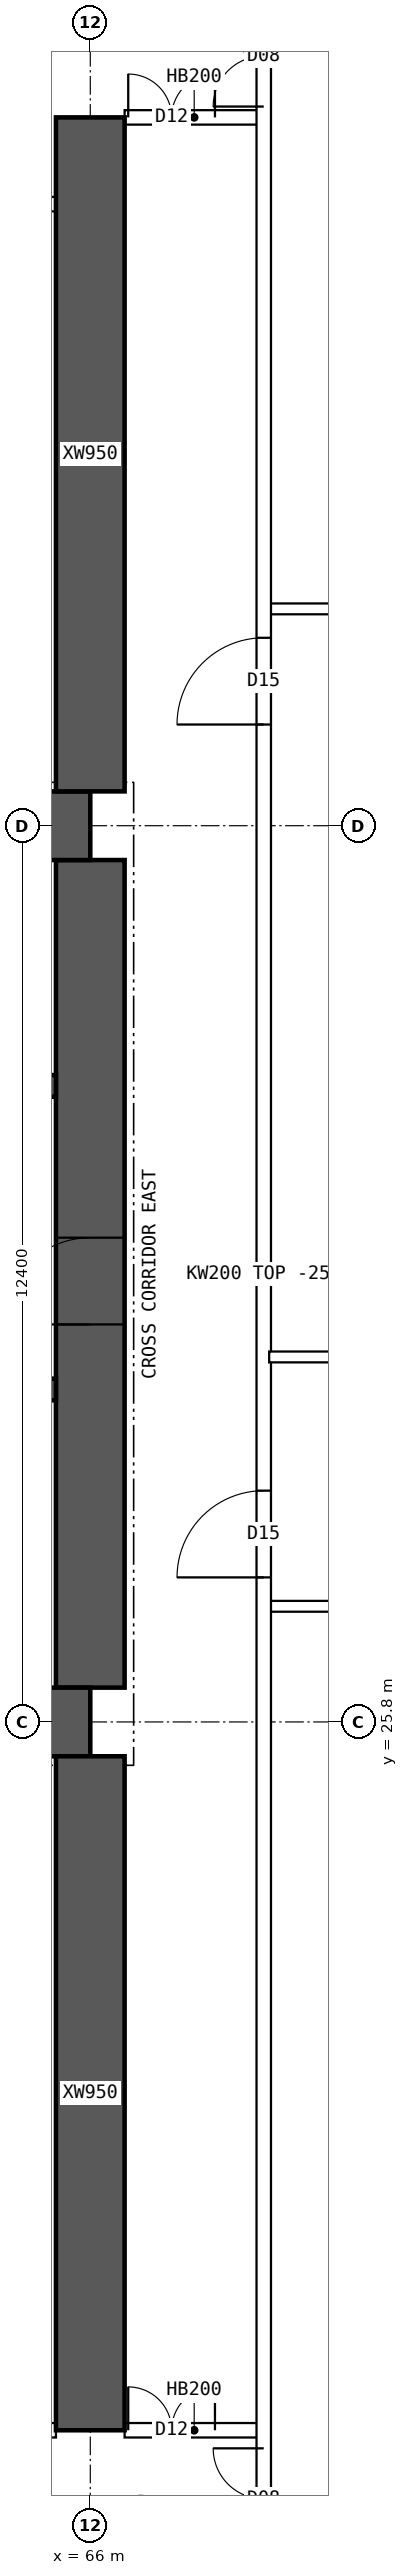
"""IFC4 building model, lengths in metres.
Left out: names, types, materials, properties, quantities, classifications, styles, units other than length and angle.
Written with IfcOpenShell. Run it as: python <this file> out.ifc"""

import sys

from ifc_helpers import new_model, si_unit, direction, frame, frame_2d, origin, place, context, subcontext, project, spatial, polyline, rectangle, outline, extrude, element, fill, save


model = new_model("IFC4")
c1 = context("Model", 3, precision=1e-05, world=origin(), true_north=direction((0.0, 1.0)))
c2 = subcontext(c1, "Body", "Model", "MODEL_VIEW")
j1 = project(units=[si_unit("LENGTHUNIT", "METRE"), si_unit("PLANEANGLEUNIT", "RADIAN")], contexts=[c1])
p1 = place(None, origin())
s1 = spatial("IfcSite", under=j1, at=p1, CompositionType="ELEMENT")
p2 = place(p1, origin())
s2 = spatial("IfcBuilding", under=s1, at=p2, CompositionType="ELEMENT")
p3 = place(p2, frame((0.0, 0.0, 91.9)))
s3 = spatial("IfcBuildingStorey", under=s2, at=p3, CompositionType="ELEMENT", Elevation=91.9)
for number, where, z_axis, x_axis in (
    (1, (18.0, 25.8, 0.0), (0.0, 0.0, 1.0), (1.0, 0.0, 0.0)),
    (2, (18.0, 38.2, 0.0), (0.0, 0.0, 1.0), (1.0, 0.0, 0.0)),
):
    element("IfcWall", number, at=place(p3, frame(where, z_axis=z_axis, x_axis=x_axis)), inside=s3, PredefinedType="SHEAR", context=c2, shape_type="SweptSolid", body=[
        extrude(rectangle(XDim=48.0, YDim=0.95, at=frame_2d((24.0, 0.0))), origin(), (0.0, 0.0, 1.0), 3.75),
    ])
p4 = place(p3, frame((66.0, 26.275, 0.0), z_axis=(0.0, 0.0, 1.0), x_axis=(0.0, 1.0, 0.0)))
e3 = element("IfcWall", 3, at=p4, inside=s3, PredefinedType="SHEAR", context=c2, shape_type="SweptSolid", body=[
    extrude(rectangle(XDim=11.45, YDim=0.95, at=frame_2d((5.725, 0.0))), origin(), (0.0, 0.0, 1.0), 3.75),
])
p5 = place(p4, frame((5.025, 0.0, 0.0)))
e4 = element("IfcOpeningElement", 4, at=p5, cuts=e3, PredefinedType="OPENING", context=c2, shape_type="SweptSolid", body=[
    extrude(rectangle(XDim=1.2, YDim=2.1, at=frame_2d((0.6, 1.05))), frame((0.0, 0.485, 0.0), z_axis=(0.0, -1.0, 0.0), x_axis=(1.0, 0.0, 0.0)), (0.0, 0.0, 1.0), 0.97),
])
p6 = place(p3, frame((18.475, 30.4, 0.0), z_axis=(0.0, 0.0, 1.0), x_axis=(1.0, 0.0, 0.0)))
e5 = element("IfcWall", 5, at=p6, inside=s3, PredefinedType="SHEAR", context=c2, shape_type="SweptSolid", body=[
    extrude(rectangle(XDim=47.05, YDim=0.3, at=frame_2d((23.525, 0.0))), origin(), (0.0, 0.0, 1.0), 3.75),
])
p7 = place(p6, frame((0.4, 0.0, 0.0)))
e6 = element("IfcOpeningElement", 6, at=p7, cuts=e5, PredefinedType="OPENING", context=c2, shape_type="SweptSolid", body=[
    extrude(rectangle(XDim=1.0, YDim=2.1, at=frame_2d((0.5, 1.05))), frame((0.0, 0.16, 0.0), z_axis=(0.0, -1.0, 0.0), x_axis=(1.0, 0.0, 0.0)), (0.0, 0.0, 1.0), 0.32),
])
p8 = place(p6, frame((45.65, 0.0, 0.0)))
e7 = element("IfcOpeningElement", 7, at=p8, cuts=e5, PredefinedType="OPENING", context=c2, shape_type="SweptSolid", body=[
    extrude(rectangle(XDim=1.0, YDim=2.1, at=frame_2d((0.5, 1.05))), frame((0.0, 0.16, 0.0), z_axis=(0.0, -1.0, 0.0), x_axis=(1.0, 0.0, 0.0)), (0.0, 0.0, 1.0), 0.32),
])
p9 = place(p6, frame((8.275, 0.0, 0.0)))
e8 = element("IfcOpeningElement", 8, at=p9, cuts=e5, PredefinedType="OPENING", context=c2, shape_type="SweptSolid", body=[
    extrude(rectangle(XDim=1.1, YDim=2.1, at=frame_2d((0.55, 1.05))), frame((0.0, 0.16, 0.0), z_axis=(0.0, -1.0, 0.0), x_axis=(1.0, 0.0, 0.0)), (0.0, 0.0, 1.0), 0.32),
])
p10 = place(p6, frame((10.875, 0.0, 0.0)))
e9 = element("IfcOpeningElement", 9, at=p10, cuts=e5, PredefinedType="OPENING", context=c2, shape_type="SweptSolid", body=[
    extrude(rectangle(XDim=1.1, YDim=2.1, at=frame_2d((0.55, 1.05))), frame((0.0, 0.16, 0.0), z_axis=(0.0, -1.0, 0.0), x_axis=(1.0, 0.0, 0.0)), (0.0, 0.0, 1.0), 0.32),
])
p11 = place(p6, frame((13.475, 0.0, 0.0)))
e10 = element("IfcOpeningElement", 10, at=p11, cuts=e5, PredefinedType="OPENING", context=c2, shape_type="SweptSolid", body=[
    extrude(rectangle(XDim=1.1, YDim=2.1, at=frame_2d((0.55, 1.05))), frame((0.0, 0.16, 0.0), z_axis=(0.0, -1.0, 0.0), x_axis=(1.0, 0.0, 0.0)), (0.0, 0.0, 1.0), 0.32),
])
p12 = place(p6, frame((16.075, 0.0, 0.0)))
e11 = element("IfcOpeningElement", 11, at=p12, cuts=e5, PredefinedType="OPENING", context=c2, shape_type="SweptSolid", body=[
    extrude(rectangle(XDim=1.1, YDim=2.1, at=frame_2d((0.55, 1.05))), frame((0.0, 0.16, 0.0), z_axis=(0.0, -1.0, 0.0), x_axis=(1.0, 0.0, 0.0)), (0.0, 0.0, 1.0), 0.32),
])
p13 = place(p6, frame((18.85, 0.0, 0.0)))
e12 = element("IfcOpeningElement", 12, at=p13, cuts=e5, PredefinedType="OPENING", context=c2, shape_type="SweptSolid", body=[
    extrude(rectangle(XDim=0.9, YDim=2.1, at=frame_2d((0.45, 1.05))), frame((0.0, 0.16, 0.0), z_axis=(0.0, -1.0, 0.0), x_axis=(1.0, 0.0, 0.0)), (0.0, 0.0, 1.0), 0.32),
])
p14 = place(p6, frame((30.142, 0.0, 0.0)))
e13 = element("IfcOpeningElement", 13, at=p14, cuts=e5, PredefinedType="OPENING", context=c2, shape_type="SweptSolid", body=[
    extrude(rectangle(XDim=1.1, YDim=2.1, at=frame_2d((0.55, 1.05))), frame((0.0, 0.16, 0.0), z_axis=(0.0, -1.0, 0.0), x_axis=(1.0, 0.0, 0.0)), (0.0, 0.0, 1.0), 0.32),
])
p15 = place(p6, frame((33.675, 0.0, 0.0)))
e14 = element("IfcOpeningElement", 14, at=p15, cuts=e5, PredefinedType="OPENING", context=c2, shape_type="SweptSolid", body=[
    extrude(rectangle(XDim=1.1, YDim=2.1, at=frame_2d((0.55, 1.05))), frame((0.0, 0.16, 0.0), z_axis=(0.0, -1.0, 0.0), x_axis=(1.0, 0.0, 0.0)), (0.0, 0.0, 1.0), 0.32),
])
p16 = place(p6, frame((37.208, 0.0, 0.0)))
e15 = element("IfcOpeningElement", 15, at=p16, cuts=e5, PredefinedType="OPENING", context=c2, shape_type="SweptSolid", body=[
    extrude(rectangle(XDim=1.1, YDim=2.1, at=frame_2d((0.55, 1.05))), frame((0.0, 0.16, 0.0), z_axis=(0.0, -1.0, 0.0), x_axis=(1.0, 0.0, 0.0)), (0.0, 0.0, 1.0), 0.32),
])
p17 = place(p3, frame((18.475, 34.6, 0.0), z_axis=(0.0, 0.0, 1.0), x_axis=(1.0, 0.0, 0.0)))
e16 = element("IfcWall", 16, at=p17, inside=s3, PredefinedType="SHEAR", context=c2, shape_type="SweptSolid", body=[
    extrude(rectangle(XDim=47.05, YDim=0.3, at=frame_2d((23.525, 0.0))), origin(), (0.0, 0.0, 1.0), 3.75),
])
p18 = place(p17, frame((0.9, 0.0, 0.0)))
e17 = element("IfcOpeningElement", 17, at=p18, cuts=e16, PredefinedType="OPENING", context=c2, shape_type="SweptSolid", body=[
    extrude(rectangle(XDim=1.1, YDim=2.1, at=frame_2d((0.55, 1.05))), frame((0.0, 0.16, 0.0), z_axis=(0.0, -1.0, 0.0), x_axis=(1.0, 0.0, 0.0)), (0.0, 0.0, 1.0), 0.32),
])
p19 = place(p17, frame((45.05, 0.0, 0.0)))
e18 = element("IfcOpeningElement", 18, at=p19, cuts=e16, PredefinedType="OPENING", context=c2, shape_type="SweptSolid", body=[
    extrude(rectangle(XDim=1.1, YDim=2.1, at=frame_2d((0.55, 1.05))), frame((0.0, 0.16, 0.0), z_axis=(0.0, -1.0, 0.0), x_axis=(1.0, 0.0, 0.0)), (0.0, 0.0, 1.0), 0.32),
])
p20 = place(p17, frame((4.125, 0.0, 0.0)))
e19 = element("IfcOpeningElement", 19, at=p20, cuts=e16, PredefinedType="OPENING", context=c2, shape_type="SweptSolid", body=[
    extrude(rectangle(XDim=0.9, YDim=2.1, at=frame_2d((0.45, 1.05))), frame((0.0, 0.16, 0.0), z_axis=(0.0, -1.0, 0.0), x_axis=(1.0, 0.0, 0.0)), (0.0, 0.0, 1.0), 0.32),
])
p21 = place(p17, frame((42.025, 0.0, 0.0)))
e20 = element("IfcOpeningElement", 20, at=p21, cuts=e16, PredefinedType="OPENING", context=c2, shape_type="SweptSolid", body=[
    extrude(rectangle(XDim=0.9, YDim=2.1, at=frame_2d((0.45, 1.05))), frame((0.0, 0.16, 0.0), z_axis=(0.0, -1.0, 0.0), x_axis=(1.0, 0.0, 0.0)), (0.0, 0.0, 1.0), 0.32),
])
p22 = place(p17, frame((8.9, 0.0, 0.0)))
e21 = element("IfcOpeningElement", 21, at=p22, cuts=e16, PredefinedType="OPENING", context=c2, shape_type="SweptSolid", body=[
    extrude(rectangle(XDim=0.9, YDim=2.1, at=frame_2d((0.45, 1.05))), frame((0.0, 0.16, 0.0), z_axis=(0.0, -1.0, 0.0), x_axis=(1.0, 0.0, 0.0)), (0.0, 0.0, 1.0), 0.32),
])
p23 = place(p17, frame((12.874, 0.0, 0.0)))
e22 = element("IfcOpeningElement", 22, at=p23, cuts=e16, PredefinedType="OPENING", context=c2, shape_type="SweptSolid", body=[
    extrude(rectangle(XDim=0.9, YDim=2.1, at=frame_2d((0.45, 1.05))), frame((0.0, 0.16, 0.0), z_axis=(0.0, -1.0, 0.0), x_axis=(1.0, 0.0, 0.0)), (0.0, 0.0, 1.0), 0.32),
])
p24 = place(p17, frame((16.521, 0.0, 0.0)))
e23 = element("IfcOpeningElement", 23, at=p24, cuts=e16, PredefinedType="OPENING", context=c2, shape_type="SweptSolid", body=[
    extrude(rectangle(XDim=0.9, YDim=2.1, at=frame_2d((0.45, 1.05))), frame((0.0, 0.16, 0.0), z_axis=(0.0, -1.0, 0.0), x_axis=(1.0, 0.0, 0.0)), (0.0, 0.0, 1.0), 0.32),
])
p25 = place(p17, frame((20.28, 0.0, 0.0)))
e24 = element("IfcOpeningElement", 24, at=p25, cuts=e16, PredefinedType="OPENING", context=c2, shape_type="SweptSolid", body=[
    extrude(rectangle(XDim=0.9, YDim=2.1, at=frame_2d((0.45, 1.05))), frame((0.0, 0.16, 0.0), z_axis=(0.0, -1.0, 0.0), x_axis=(1.0, 0.0, 0.0)), (0.0, 0.0, 1.0), 0.32),
])
p26 = place(p17, frame((24.686, 0.0, 0.0)))
e25 = element("IfcOpeningElement", 25, at=p26, cuts=e16, PredefinedType="OPENING", context=c2, shape_type="SweptSolid", body=[
    extrude(rectangle(XDim=0.9, YDim=2.1, at=frame_2d((0.45, 1.05))), frame((0.0, 0.16, 0.0), z_axis=(0.0, -1.0, 0.0), x_axis=(1.0, 0.0, 0.0)), (0.0, 0.0, 1.0), 0.32),
])
p27 = place(p17, frame((27.483, 0.0, 0.0)))
e26 = element("IfcOpeningElement", 26, at=p27, cuts=e16, PredefinedType="OPENING", context=c2, shape_type="SweptSolid", body=[
    extrude(rectangle(XDim=0.9, YDim=2.1, at=frame_2d((0.45, 1.05))), frame((0.0, 0.16, 0.0), z_axis=(0.0, -1.0, 0.0), x_axis=(1.0, 0.0, 0.0)), (0.0, 0.0, 1.0), 0.32),
])
p28 = place(p17, frame((30.666, 0.0, 0.0)))
e27 = element("IfcOpeningElement", 27, at=p28, cuts=e16, PredefinedType="OPENING", context=c2, shape_type="SweptSolid", body=[
    extrude(rectangle(XDim=0.9, YDim=2.1, at=frame_2d((0.45, 1.05))), frame((0.0, 0.16, 0.0), z_axis=(0.0, -1.0, 0.0), x_axis=(1.0, 0.0, 0.0)), (0.0, 0.0, 1.0), 0.32),
])
p29 = place(p17, frame((34.617, 0.0, 0.0)))
e28 = element("IfcOpeningElement", 28, at=p29, cuts=e16, PredefinedType="OPENING", context=c2, shape_type="SweptSolid", body=[
    extrude(rectangle(XDim=0.9, YDim=2.1, at=frame_2d((0.45, 1.05))), frame((0.0, 0.16, 0.0), z_axis=(0.0, -1.0, 0.0), x_axis=(1.0, 0.0, 0.0)), (0.0, 0.0, 1.0), 0.32),
])
p30 = place(p17, frame((37.555, 0.0, 0.0)))
e29 = element("IfcOpeningElement", 29, at=p30, cuts=e16, PredefinedType="OPENING", context=c2, shape_type="SweptSolid", body=[
    extrude(rectangle(XDim=0.9, YDim=2.1, at=frame_2d((0.45, 1.05))), frame((0.0, 0.16, 0.0), z_axis=(0.0, -1.0, 0.0), x_axis=(1.0, 0.0, 0.0)), (0.0, 0.0, 1.0), 0.32),
])
for number, where, z_axis, x_axis in (
    (30, (66.0, 16.0, 0.0), (0.0, 0.0, 1.0), (0.0, 1.0, 0.0)),
    (31, (66.0, 38.675, 0.0), (0.0, 0.0, 1.0), (0.0, 1.0, 0.0)),
):
    element("IfcWall", number, at=place(p3, frame(where, z_axis=z_axis, x_axis=x_axis)), inside=s3, PredefinedType="SHEAR", context=c2, shape_type="SweptSolid", body=[
        extrude(rectangle(XDim=9.325, YDim=0.95, at=frame_2d((4.663, 0.0))), origin(), (0.0, 0.0, 1.0), 3.75),
    ])
p31 = place(p3, frame((60.475, 16.0, 0.0), z_axis=(0.0, 0.0, 1.0), x_axis=(1.0, 0.0, 0.0)))
e32 = element("IfcWall", 32, at=p31, inside=s3, PredefinedType="SOLIDWALL", context=c2, shape_type="SweptSolid", body=[
    extrude(rectangle(XDim=5.05, YDim=0.2, at=frame_2d((2.525, 0.0))), origin(), (0.0, 0.0, 1.0), 3.5),
])
p32 = place(p31, frame((0.15, 0.0, 0.0)))
e33 = element("IfcOpeningElement", 33, at=p32, cuts=e32, PredefinedType="OPENING", context=c2, shape_type="SweptSolid", body=[
    extrude(rectangle(XDim=0.9, YDim=2.1, at=frame_2d((0.45, 1.05))), frame((0.0, 0.11, 0.0), z_axis=(0.0, -1.0, 0.0), x_axis=(1.0, 0.0, 0.0)), (0.0, 0.0, 1.0), 0.22),
])
p33 = place(p31, frame((3.185, 0.0, 0.0)))
e34 = element("IfcOpeningElement", 34, at=p33, cuts=e32, PredefinedType="OPENING", context=c2, shape_type="SweptSolid", body=[
    extrude(rectangle(XDim=0.9, YDim=2.1, at=frame_2d((0.45, 1.05))), frame((0.0, 0.11, 0.0), z_axis=(0.0, -1.0, 0.0), x_axis=(1.0, 0.0, 0.0)), (0.0, 0.0, 1.0), 0.22),
])
p34 = place(p3, frame((66.475, 16.0, 0.0), z_axis=(0.0, 0.0, 1.0), x_axis=(1.0, 0.0, 0.0)))
e35 = element("IfcWall", 35, at=p34, inside=s3, PredefinedType="SOLIDWALL", context=c2, shape_type="SweptSolid", body=[
    extrude(rectangle(XDim=1.925, YDim=0.2, at=frame_2d((0.962, 0.0))), origin(), (0.0, 0.0, 1.0), 3.5),
])
p35 = place(p34, frame((0.05, 0.0, 0.0)))
e36 = element("IfcOpeningElement", 36, at=p35, cuts=e35, PredefinedType="OPENING", context=c2, shape_type="SweptSolid", body=[
    extrude(rectangle(XDim=1.2, YDim=2.1, at=frame_2d((0.6, 1.05))), frame((0.0, 0.11, 0.0), z_axis=(0.0, -1.0, 0.0), x_axis=(1.0, 0.0, 0.0)), (0.0, 0.0, 1.0), 0.22),
])
p36 = place(p3, frame((66.475, 48.0, 0.0), z_axis=(0.0, 0.0, 1.0), x_axis=(1.0, 0.0, 0.0)))
e37 = element("IfcWall", 37, at=p36, inside=s3, PredefinedType="SOLIDWALL", context=c2, shape_type="SweptSolid", body=[
    extrude(rectangle(XDim=1.925, YDim=0.2, at=frame_2d((0.962, 0.0))), origin(), (0.0, 0.0, 1.0), 3.5),
])
p37 = place(p36, frame((0.05, 0.0, 0.0)))
e38 = element("IfcOpeningElement", 38, at=p37, cuts=e37, PredefinedType="OPENING", context=c2, shape_type="SweptSolid", body=[
    extrude(rectangle(XDim=1.2, YDim=2.1, at=frame_2d((0.6, 1.05))), frame((0.0, 0.11, 0.0), z_axis=(0.0, -1.0, 0.0), x_axis=(1.0, 0.0, 0.0)), (0.0, 0.0, 1.0), 0.22),
])
p38 = place(p3, frame((60.475, 46.8, 0.0), z_axis=(0.0, 0.0, 1.0), x_axis=(1.0, 0.0, 0.0)))
e39 = element("IfcWall", 39, at=p38, inside=s3, PredefinedType="SOLIDWALL", context=c2, shape_type="SweptSolid", body=[
    extrude(rectangle(XDim=5.05, YDim=0.2, at=frame_2d((2.525, 0.0))), origin(), (0.0, 0.0, 1.0), 3.5),
])
p39 = place(p38, frame((0.4, 0.0, 0.0)))
e40 = element("IfcOpeningElement", 40, at=p39, cuts=e39, PredefinedType="OPENING", context=c2, shape_type="SweptSolid", body=[
    extrude(rectangle(XDim=1.0, YDim=2.1, at=frame_2d((0.5, 1.05))), frame((0.0, 0.11, 0.0), z_axis=(0.0, -1.0, 0.0), x_axis=(1.0, 0.0, 0.0)), (0.0, 0.0, 1.0), 0.22),
])
p40 = place(p3, frame((68.475, 30.85, 0.0), z_axis=(0.0, 0.0, 1.0), x_axis=(1.0, 0.0, 0.0)))
e41 = element("IfcWall", 41, at=p40, inside=s3, PredefinedType="PARTITIONING", context=c2, shape_type="SweptSolid", body=[
    extrude(outline(polyline([(0.0, 0.0), (6.82, 0.0), (6.82, 3.5), (3.827, 3.5), (3.825, 3.05), (3.227, 3.05), (3.225, 3.5), (0.0, 3.5), (0.0, 0.0)])), frame((0.0, 0.075, 0.0), z_axis=(0.0, -1.0, 0.0), x_axis=(1.0, 0.0, 0.0)), (0.0, 0.0, 1.0), 0.15),
])
p41 = place(p3, frame((68.4, 9.405, 0.0), z_axis=(0.0, 0.0, 1.0), x_axis=(0.0, 1.0, 0.0)))
e42 = element("IfcWall", 42, at=p41, inside=s3, PredefinedType="SOLIDWALL", context=c2, shape_type="SweptSolid", body=[
    extrude(rectangle(XDim=45.189, YDim=0.2, at=frame_2d((22.595, 0.0))), origin(), (0.0, 0.0, 1.0), 3.5),
])
p42 = place(p41, frame((18.395, 0.0, 0.0)))
e43 = element("IfcOpeningElement", 43, at=p42, cuts=e42, PredefinedType="OPENING", context=c2, shape_type="SweptSolid", body=[
    extrude(rectangle(XDim=1.2, YDim=2.1, at=frame_2d((0.6, 1.05))), frame((0.0, 0.11, 0.0), z_axis=(0.0, -1.0, 0.0), x_axis=(1.0, 0.0, 0.0)), (0.0, 0.0, 1.0), 0.22),
])
p43 = place(p41, frame((30.195, 0.0, 0.0)))
e44 = element("IfcOpeningElement", 44, at=p43, cuts=e42, PredefinedType="OPENING", context=c2, shape_type="SweptSolid", body=[
    extrude(rectangle(XDim=1.2, YDim=2.1, at=frame_2d((0.6, 1.05))), frame((0.0, 0.11, 0.0), z_axis=(0.0, -1.0, 0.0), x_axis=(1.0, 0.0, 0.0)), (0.0, 0.0, 1.0), 0.22),
])
p44 = place(p41, frame((4.945, 0.0, 0.0)))
e45 = element("IfcOpeningElement", 45, at=p44, cuts=e42, PredefinedType="OPENING", context=c2, shape_type="SweptSolid", body=[
    extrude(rectangle(XDim=1.4, YDim=2.1, at=frame_2d((0.7, 1.05))), frame((0.0, 0.11, 0.0), z_axis=(0.0, -1.0, 0.0), x_axis=(1.0, 0.0, 0.0)), (0.0, 0.0, 1.0), 0.22),
])
p45 = place(p41, frame((38.745, 0.0, 0.0)))
e46 = element("IfcOpeningElement", 46, at=p45, cuts=e42, PredefinedType="OPENING", context=c2, shape_type="SweptSolid", body=[
    extrude(rectangle(XDim=1.4, YDim=2.1, at=frame_2d((0.7, 1.05))), frame((0.0, 0.11, 0.0), z_axis=(0.0, -1.0, 0.0), x_axis=(1.0, 0.0, 0.0)), (0.0, 0.0, 1.0), 0.22),
])
p46 = place(p3, frame((68.475, 27.4, 0.0), z_axis=(0.0, 0.0, 1.0), x_axis=(1.0, 0.0, 0.0)))
e47 = element("IfcWall", 47, at=p46, inside=s3, PredefinedType="PARTITIONING", context=c2, shape_type="SweptSolid", body=[
    extrude(rectangle(XDim=6.82, YDim=0.15, at=frame_2d((3.41, 0.0))), origin(), (0.0, 0.0, 1.0), 3.5),
])
p47 = place(p3, frame((68.475, 41.2, 0.0), z_axis=(0.0, 0.0, 1.0), x_axis=(1.0, 0.0, 0.0)))
e48 = element("IfcWall", 48, at=p47, inside=s3, PredefinedType="PARTITIONING", context=c2, shape_type="SweptSolid", body=[
    extrude(outline(polyline([(0.0, 0.0), (6.82, 0.0), (6.82, 3.5), (3.827, 3.5), (3.825, 3.05), (3.227, 3.05), (3.225, 3.5), (0.0, 3.5), (0.0, 0.0)])), frame((0.0, 0.075, 0.0), z_axis=(0.0, -1.0, 0.0), x_axis=(1.0, 0.0, 0.0)), (0.0, 0.0, 1.0), 0.15),
])
p48 = place(p5, origin())
e49 = element("IfcDoor", 49, at=p48, inside=s3, OperationType="SINGLE_SWING_LEFT", PredefinedType="DOOR", context=c2, shape_type="SweptSolid", body=[
    extrude(rectangle(XDim=1.2, YDim=2.1, at=frame_2d((0.6, 1.05))), frame((0.0, 0.025, 0.0), z_axis=(0.0, -1.0, 0.0), x_axis=(1.0, 0.0, 0.0)), (0.0, 0.0, 1.0), 0.05),
])
fill(e4, e49)
p49 = place(p35, origin())
e50 = element("IfcDoor", 50, at=p49, inside=s3, OperationType="DOUBLE_DOOR_SINGLE_SWING", PredefinedType="DOOR", context=c2, shape_type="SweptSolid", body=[
    extrude(rectangle(XDim=1.2, YDim=2.1, at=frame_2d((0.6, 1.05))), frame((0.0, 0.025, 0.0), z_axis=(0.0, -1.0, 0.0), x_axis=(1.0, 0.0, 0.0)), (0.0, 0.0, 1.0), 0.05),
])
fill(e36, e50)
p50 = place(p37, origin())
e51 = element("IfcDoor", 51, at=p50, inside=s3, OperationType="DOUBLE_DOOR_SINGLE_SWING", PredefinedType="DOOR", context=c2, shape_type="SweptSolid", body=[
    extrude(rectangle(XDim=1.2, YDim=2.1, at=frame_2d((0.6, 1.05))), frame((0.0, 0.025, 0.0), z_axis=(0.0, -1.0, 0.0), x_axis=(1.0, 0.0, 0.0)), (0.0, 0.0, 1.0), 0.05),
])
fill(e38, e51)
p51 = place(p42, origin())
e52 = element("IfcDoor", 52, at=p51, inside=s3, OperationType="SINGLE_SWING_LEFT", PredefinedType="DOOR", context=c2, shape_type="SweptSolid", body=[
    extrude(rectangle(XDim=1.2, YDim=2.1, at=frame_2d((0.6, 1.05))), frame((0.0, 0.025, 0.0), z_axis=(0.0, -1.0, 0.0), x_axis=(1.0, 0.0, 0.0)), (0.0, 0.0, 1.0), 0.05),
])
fill(e43, e52)
p52 = place(p43, origin())
e53 = element("IfcDoor", 53, at=p52, inside=s3, OperationType="SINGLE_SWING_LEFT", PredefinedType="DOOR", context=c2, shape_type="SweptSolid", body=[
    extrude(rectangle(XDim=1.2, YDim=2.1, at=frame_2d((0.6, 1.05))), frame((0.0, 0.025, 0.0), z_axis=(0.0, -1.0, 0.0), x_axis=(1.0, 0.0, 0.0)), (0.0, 0.0, 1.0), 0.05),
])
fill(e44, e53)
p53 = place(p44, origin())
e54 = element("IfcDoor", 54, at=p53, inside=s3, OperationType="DOUBLE_DOOR_SINGLE_SWING", PredefinedType="DOOR", context=c2, shape_type="SweptSolid", body=[
    extrude(rectangle(XDim=1.4, YDim=2.1, at=frame_2d((0.7, 1.05))), frame((0.0, 0.025, 0.0), z_axis=(0.0, -1.0, 0.0), x_axis=(1.0, 0.0, 0.0)), (0.0, 0.0, 1.0), 0.05),
])
fill(e45, e54)
p54 = place(p45, origin())
e55 = element("IfcDoor", 55, at=p54, inside=s3, OperationType="DOUBLE_DOOR_SINGLE_SWING", PredefinedType="DOOR", context=c2, shape_type="SweptSolid", body=[
    extrude(rectangle(XDim=1.4, YDim=2.1, at=frame_2d((0.7, 1.05))), frame((0.0, 0.025, 0.0), z_axis=(0.0, -1.0, 0.0), x_axis=(1.0, 0.0, 0.0)), (0.0, 0.0, 1.0), 0.05),
])
fill(e46, e55)
save(model, sys.argv[1])
